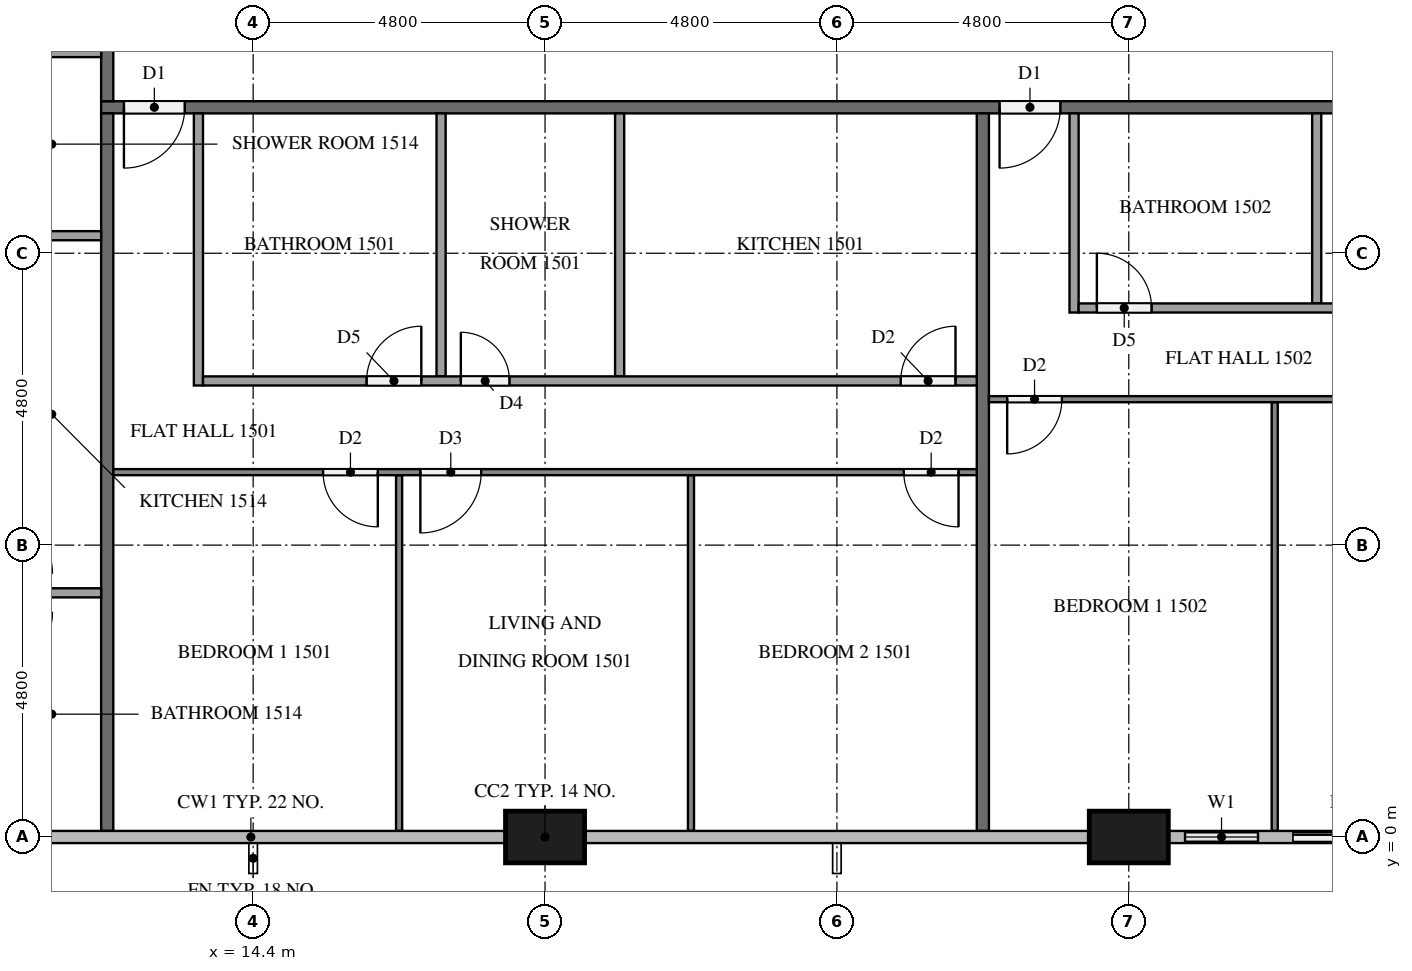
"""IFC4 building model, lengths in metres.
Left out: names, types, materials, properties, quantities, classifications, styles, units other than length and angle.
Written with IfcOpenShell. Run it as: python <this file> out.ifc"""

import sys

from ifc_helpers import new_model, si_unit, direction, frame, frame_2d, origin, origin_2d, place, context, subcontext, project, spatial, rectangle, extrude, element, fill, save


model = new_model("IFC4")
c1 = context("Model", 3, precision=1e-05, world=origin(), true_north=direction((0.0, 1.0)))
c2 = subcontext(c1, "Body", "Model", "MODEL_VIEW")
j1 = project(units=[si_unit("LENGTHUNIT", "METRE"), si_unit("PLANEANGLEUNIT", "RADIAN")], contexts=[c1])
p1 = place(None, origin())
s1 = spatial("IfcSite", under=j1, at=p1, CompositionType="ELEMENT")
p2 = place(p1, origin())
s2 = spatial("IfcBuilding", under=s1, at=p2, CompositionType="ELEMENT")
p3 = place(p2, frame((0.0, 0.0, 62.8)))
s3 = spatial("IfcBuildingStorey", under=s2, at=p3, CompositionType="ELEMENT", Elevation=62.8)
for number, where, z_axis, x_axis in (
    (1, (19.2, 0.0, 0.0), (0.0, 0.0, 1.0), (1.0, 0.0, 0.0)),
    (2, (28.8, 0.0, 0.0), (0.0, 0.0, 1.0), (1.0, 0.0, 0.0)),
):
    element("IfcColumn", number, at=place(p3, frame(where, z_axis=z_axis, x_axis=x_axis)), inside=s3, PredefinedType="COLUMN", context=c2, shape_type="SweptSolid", body=[
        extrude(rectangle(XDim=1.3, YDim=0.85, at=origin_2d()), origin(), (0.0, 0.0, 1.0), 3.2),
    ])
p4 = place(p3, frame((29.45, 0.0, 0.0), z_axis=(0.0, 0.0, 1.0), x_axis=(1.0, 0.0, 0.0)))
e3 = element("IfcWall", 3, at=p4, inside=s3, PredefinedType="SOLIDWALL", context=c2, shape_type="SweptSolid", body=[
    extrude(rectangle(XDim=4.15, YDim=0.15, at=frame_2d((2.075, 0.0))), origin(), (0.0, 0.0, 1.0), 3.2),
])
p5 = place(p4, frame((0.275, 0.0, 0.9)))
e4 = element("IfcOpeningElement", 4, at=p5, cuts=e3, PredefinedType="OPENING", context=c2, shape_type="SweptSolid", body=[
    extrude(rectangle(XDim=1.2, YDim=1.4, at=frame_2d((0.6, 0.7))), frame((0.0, 0.085, 0.0), z_axis=(0.0, -1.0, 0.0), x_axis=(1.0, 0.0, 0.0)), (0.0, 0.0, 1.0), 0.17),
])
p6 = place(p4, frame((2.05, 0.0, 0.0)))
e5 = element("IfcOpeningElement", 5, at=p6, cuts=e3, PredefinedType="OPENING", context=c2, shape_type="SweptSolid", body=[
    extrude(rectangle(XDim=1.8, YDim=2.4, at=frame_2d((0.9, 1.2))), frame((0.0, 0.085, 0.0), z_axis=(0.0, -1.0, 0.0), x_axis=(1.0, 0.0, 0.0)), (0.0, 0.0, 1.0), 0.17),
])
p7 = place(p3, frame((50.5, 12.0, 0.0), z_axis=(0.0, 0.0, 1.0), x_axis=(-1.0, 0.0, 0.0)))
e6 = element("IfcWall", 6, at=p7, inside=s3, PredefinedType="PARTITIONING", context=c2, shape_type="SweptSolid", body=[
    extrude(rectangle(XDim=38.6, YDim=0.2, at=frame_2d((19.3, 0.0))), origin(), (0.0, 0.0, 1.0), 3.2),
])
p8 = place(p7, frame((37.225, 0.0, 0.0)))
e7 = element("IfcOpeningElement", 7, at=p8, cuts=e6, PredefinedType="OPENING", context=c2, shape_type="SweptSolid", body=[
    extrude(rectangle(XDim=1.0, YDim=2.1, at=frame_2d((0.5, 1.05))), frame((0.0, 0.11, 0.0), z_axis=(0.0, -1.0, 0.0), x_axis=(1.0, 0.0, 0.0)), (0.0, 0.0, 1.0), 0.22),
])
p9 = place(p7, frame((22.825, 0.0, 0.0)))
e8 = element("IfcOpeningElement", 8, at=p9, cuts=e6, PredefinedType="OPENING", context=c2, shape_type="SweptSolid", body=[
    extrude(rectangle(XDim=1.0, YDim=2.1, at=frame_2d((0.5, 1.05))), frame((0.0, 0.11, 0.0), z_axis=(0.0, -1.0, 0.0), x_axis=(1.0, 0.0, 0.0)), (0.0, 0.0, 1.0), 0.22),
])
p10 = place(p7, frame((0.375, 0.0, 0.0)))
e9 = element("IfcOpeningElement", 9, at=p10, cuts=e6, PredefinedType="OPENING", context=c2, shape_type="SweptSolid", body=[
    extrude(rectangle(XDim=1.0, YDim=2.1, at=frame_2d((0.5, 1.05))), frame((0.0, 0.11, 0.0), z_axis=(0.0, -1.0, 0.0), x_axis=(1.0, 0.0, 0.0)), (0.0, 0.0, 1.0), 0.22),
])
p11 = place(p3, frame((12.0, 12.1, 0.0), z_axis=(0.0, 0.0, 1.0), x_axis=(0.0, 1.0, 0.0)))
e10 = element("IfcWall", 10, at=p11, inside=s3, PredefinedType="PARTITIONING", context=c2, shape_type="SweptSolid", body=[
    extrude(rectangle(XDim=28.6, YDim=0.2, at=frame_2d((14.3, 0.0))), origin(), (0.0, 0.0, 1.0), 3.2),
])
p12 = place(p11, frame((19.375, 0.0, 0.0)))
e11 = element("IfcOpeningElement", 11, at=p12, cuts=e10, PredefinedType="OPENING", context=c2, shape_type="SweptSolid", body=[
    extrude(rectangle(XDim=1.0, YDim=2.1, at=frame_2d((0.5, 1.05))), frame((0.0, 0.11, 0.0), z_axis=(0.0, -1.0, 0.0), x_axis=(1.0, 0.0, 0.0)), (0.0, 0.0, 1.0), 0.22),
])
p13 = place(p11, frame((12.175, 0.0, 0.0)))
e12 = element("IfcOpeningElement", 12, at=p13, cuts=e10, PredefinedType="OPENING", context=c2, shape_type="SweptSolid", body=[
    extrude(rectangle(XDim=1.0, YDim=2.1, at=frame_2d((0.5, 1.05))), frame((0.0, 0.11, 0.0), z_axis=(0.0, -1.0, 0.0), x_axis=(1.0, 0.0, 0.0)), (0.0, 0.0, 1.0), 0.22),
])
p14 = place(p11, frame((2.575, 0.0, 0.0)))
e13 = element("IfcOpeningElement", 13, at=p14, cuts=e10, PredefinedType="OPENING", context=c2, shape_type="SweptSolid", body=[
    extrude(rectangle(XDim=1.0, YDim=2.1, at=frame_2d((0.5, 1.05))), frame((0.0, 0.11, 0.0), z_axis=(0.0, -1.0, 0.0), x_axis=(1.0, 0.0, 0.0)), (0.0, 0.0, 1.0), 0.22),
])
p15 = place(p11, frame((1.025, 0.0, 0.0)))
e14 = element("IfcOpeningElement", 14, at=p15, cuts=e10, PredefinedType="OPENING", context=c2, shape_type="SweptSolid", body=[
    extrude(rectangle(XDim=1.0, YDim=2.1, at=frame_2d((0.5, 1.05))), frame((0.0, 0.11, 0.0), z_axis=(0.0, -1.0, 0.0), x_axis=(1.0, 0.0, 0.0)), (0.0, 0.0, 1.0), 0.22),
])
for number, where, z_axis, x_axis in (
    (15, (26.4, 11.9, 0.0), (0.0, 0.0, 1.0), (0.0, -1.0, 0.0)),
    (16, (12.0, 0.1, 0.0), (0.0, 0.0, 1.0), (0.0, 1.0, 0.0)),
):
    element("IfcWall", number, at=place(p3, frame(where, z_axis=z_axis, x_axis=x_axis)), inside=s3, PredefinedType="PARTITIONING", context=c2, shape_type="SweptSolid", body=[
        extrude(rectangle(XDim=11.8, YDim=0.2, at=frame_2d((5.9, 0.0))), origin(), (0.0, 0.0, 1.0), 3.2),
    ])
for number, where, z_axis, x_axis in (
    (17, (16.8, 5.95, 0.0), (0.0, 0.0, 1.0), (0.0, -1.0, 0.0)),
    (18, (21.6, 5.95, 0.0), (0.0, 0.0, 1.0), (0.0, -1.0, 0.0)),
):
    element("IfcWall", number, at=place(p3, frame(where, z_axis=z_axis, x_axis=x_axis)), inside=s3, PredefinedType="PARTITIONING", context=c2, shape_type="SweptSolid", body=[
        extrude(rectangle(XDim=5.85, YDim=0.1, at=frame_2d((2.925, 0.0))), origin(), (0.0, 0.0, 1.0), 3.2),
    ])
p16 = place(p3, frame((26.3, 6.0, 0.0), z_axis=(0.0, 0.0, 1.0), x_axis=(-1.0, 0.0, 0.0)))
e19 = element("IfcWall", 19, at=p16, inside=s3, PredefinedType="PARTITIONING", context=c2, shape_type="SweptSolid", body=[
    extrude(rectangle(XDim=14.2, YDim=0.1, at=frame_2d((7.1, 0.0))), origin(), (0.0, 0.0, 1.0), 3.2),
])
p17 = place(p16, frame((9.85, 0.0, 0.0)))
e20 = element("IfcOpeningElement", 20, at=p17, cuts=e19, PredefinedType="OPENING", context=c2, shape_type="SweptSolid", body=[
    extrude(rectangle(XDim=0.9, YDim=2.1, at=frame_2d((0.45, 1.05))), frame((0.0, 0.06, 0.0), z_axis=(0.0, -1.0, 0.0), x_axis=(1.0, 0.0, 0.0)), (0.0, 0.0, 1.0), 0.12),
])
p18 = place(p16, frame((8.15, 0.0, 0.0)))
e21 = element("IfcOpeningElement", 21, at=p18, cuts=e19, PredefinedType="OPENING", context=c2, shape_type="SweptSolid", body=[
    extrude(rectangle(XDim=1.0, YDim=2.1, at=frame_2d((0.5, 1.05))), frame((0.0, 0.06, 0.0), z_axis=(0.0, -1.0, 0.0), x_axis=(1.0, 0.0, 0.0)), (0.0, 0.0, 1.0), 0.12),
])
p19 = place(p16, frame((0.3, 0.0, 0.0)))
e22 = element("IfcOpeningElement", 22, at=p19, cuts=e19, PredefinedType="OPENING", context=c2, shape_type="SweptSolid", body=[
    extrude(rectangle(XDim=0.9, YDim=2.1, at=frame_2d((0.45, 1.05))), frame((0.0, 0.06, 0.0), z_axis=(0.0, -1.0, 0.0), x_axis=(1.0, 0.0, 0.0)), (0.0, 0.0, 1.0), 0.12),
])
for number, where, z_axis, x_axis in (
    (23, (17.49, 11.9, 0.0), (0.0, 0.0, 1.0), (0.0, -1.0, 0.0)),
    (24, (20.427, 11.9, 0.0), (0.0, 0.0, 1.0), (0.0, -1.0, 0.0)),
):
    element("IfcWall", number, at=place(p3, frame(where, z_axis=z_axis, x_axis=x_axis)), inside=s3, PredefinedType="PARTITIONING", context=c2, shape_type="SweptSolid", body=[
        extrude(rectangle(XDim=4.325, YDim=0.15, at=frame_2d((2.163, 0.0))), origin(), (0.0, 0.0, 1.0), 3.2),
    ])
p20 = place(p3, frame((13.5, 11.9, 0.0), z_axis=(0.0, 0.0, 1.0), x_axis=(0.0, -1.0, 0.0)))
e25 = element("IfcWall", 25, at=p20, inside=s3, PredefinedType="PARTITIONING", context=c2, shape_type="SweptSolid", body=[
    extrude(rectangle(XDim=4.475, YDim=0.15, at=frame_2d((2.237, 0.0))), origin(), (0.0, 0.0, 1.0), 3.2),
])
p21 = place(p3, frame((13.575, 7.5, 0.0), z_axis=(0.0, 0.0, 1.0), x_axis=(1.0, 0.0, 0.0)))
e26 = element("IfcWall", 26, at=p21, inside=s3, PredefinedType="PARTITIONING", context=c2, shape_type="SweptSolid", body=[
    extrude(rectangle(XDim=12.725, YDim=0.15, at=frame_2d((6.363, 0.0))), origin(), (0.0, 0.0, 1.0), 3.2),
])
p22 = place(p21, frame((2.69, 0.0, 0.0)))
e27 = element("IfcOpeningElement", 27, at=p22, cuts=e26, PredefinedType="OPENING", context=c2, shape_type="SweptSolid", body=[
    extrude(rectangle(XDim=0.9, YDim=2.1, at=frame_2d((0.45, 1.05))), frame((0.0, 0.085, 0.0), z_axis=(0.0, -1.0, 0.0), x_axis=(1.0, 0.0, 0.0)), (0.0, 0.0, 1.0), 0.17),
])
p23 = place(p21, frame((4.24, 0.0, 0.0)))
e28 = element("IfcOpeningElement", 28, at=p23, cuts=e26, PredefinedType="OPENING", context=c2, shape_type="SweptSolid", body=[
    extrude(rectangle(XDim=0.8, YDim=2.1, at=frame_2d((0.4, 1.05))), frame((0.0, 0.085, 0.0), z_axis=(0.0, -1.0, 0.0), x_axis=(1.0, 0.0, 0.0)), (0.0, 0.0, 1.0), 0.17),
])
p24 = place(p21, frame((11.475, 0.0, 0.0)))
e29 = element("IfcOpeningElement", 29, at=p24, cuts=e26, PredefinedType="OPENING", context=c2, shape_type="SweptSolid", body=[
    extrude(rectangle(XDim=0.9, YDim=2.1, at=frame_2d((0.45, 1.05))), frame((0.0, 0.085, 0.0), z_axis=(0.0, -1.0, 0.0), x_axis=(1.0, 0.0, 0.0)), (0.0, 0.0, 1.0), 0.17),
])
p25 = place(p3, frame((31.2, 7.15, 0.0), z_axis=(0.0, 0.0, 1.0), x_axis=(0.0, -1.0, 0.0)))
e30 = element("IfcWall", 30, at=p25, inside=s3, PredefinedType="PARTITIONING", context=c2, shape_type="SweptSolid", body=[
    extrude(rectangle(XDim=7.05, YDim=0.1, at=frame_2d((3.525, 0.0))), origin(), (0.0, 0.0, 1.0), 3.2),
])
p26 = place(p3, frame((40.7, 7.2, 0.0), z_axis=(0.0, 0.0, 1.0), x_axis=(-1.0, 0.0, 0.0)))
e31 = element("IfcWall", 31, at=p26, inside=s3, PredefinedType="PARTITIONING", context=c2, shape_type="SweptSolid", body=[
    extrude(rectangle(XDim=14.2, YDim=0.1, at=frame_2d((7.1, 0.0))), origin(), (0.0, 0.0, 1.0), 3.2),
])
p27 = place(p26, frame((13.0, 0.0, 0.0)))
e32 = element("IfcOpeningElement", 32, at=p27, cuts=e31, PredefinedType="OPENING", context=c2, shape_type="SweptSolid", body=[
    extrude(rectangle(XDim=0.9, YDim=2.1, at=frame_2d((0.45, 1.05))), frame((0.0, 0.06, 0.0), z_axis=(0.0, -1.0, 0.0), x_axis=(1.0, 0.0, 0.0)), (0.0, 0.0, 1.0), 0.12),
])
p28 = place(p26, frame((5.05, 0.0, 0.0)))
e33 = element("IfcOpeningElement", 33, at=p28, cuts=e31, PredefinedType="OPENING", context=c2, shape_type="SweptSolid", body=[
    extrude(rectangle(XDim=1.0, YDim=2.1, at=frame_2d((0.5, 1.05))), frame((0.0, 0.06, 0.0), z_axis=(0.0, -1.0, 0.0), x_axis=(1.0, 0.0, 0.0)), (0.0, 0.0, 1.0), 0.12),
])
p29 = place(p26, frame((3.45, 0.0, 0.0)))
e34 = element("IfcOpeningElement", 34, at=p29, cuts=e31, PredefinedType="OPENING", context=c2, shape_type="SweptSolid", body=[
    extrude(rectangle(XDim=0.9, YDim=2.1, at=frame_2d((0.45, 1.05))), frame((0.0, 0.06, 0.0), z_axis=(0.0, -1.0, 0.0), x_axis=(1.0, 0.0, 0.0)), (0.0, 0.0, 1.0), 0.12),
])
p30 = place(p3, frame((31.89, 11.9, 0.0), z_axis=(0.0, 0.0, 1.0), x_axis=(0.0, -1.0, 0.0)))
e35 = element("IfcWall", 35, at=p30, inside=s3, PredefinedType="PARTITIONING", context=c2, shape_type="SweptSolid", body=[
    extrude(rectangle(XDim=3.125, YDim=0.15, at=frame_2d((1.562, 0.0))), origin(), (0.0, 0.0, 1.0), 3.2),
])
p31 = place(p3, frame((27.9, 11.9, 0.0), z_axis=(0.0, 0.0, 1.0), x_axis=(0.0, -1.0, 0.0)))
e36 = element("IfcWall", 36, at=p31, inside=s3, PredefinedType="PARTITIONING", context=c2, shape_type="SweptSolid", body=[
    extrude(rectangle(XDim=3.275, YDim=0.15, at=frame_2d((1.637, 0.0))), origin(), (0.0, 0.0, 1.0), 3.2),
])
p32 = place(p3, frame((27.975, 8.7, 0.0), z_axis=(0.0, 0.0, 1.0), x_axis=(1.0, 0.0, 0.0)))
e37 = element("IfcWall", 37, at=p32, inside=s3, PredefinedType="PARTITIONING", context=c2, shape_type="SweptSolid", body=[
    extrude(rectangle(XDim=12.725, YDim=0.15, at=frame_2d((6.362, 0.0))), origin(), (0.0, 0.0, 1.0), 3.2),
])
p33 = place(p32, frame((0.3, 0.0, 0.0)))
e38 = element("IfcOpeningElement", 38, at=p33, cuts=e37, PredefinedType="OPENING", context=c2, shape_type="SweptSolid", body=[
    extrude(rectangle(XDim=0.9, YDim=2.1, at=frame_2d((0.45, 1.05))), frame((0.0, 0.085, 0.0), z_axis=(0.0, -1.0, 0.0), x_axis=(1.0, 0.0, 0.0)), (0.0, 0.0, 1.0), 0.17),
])
p34 = place(p32, frame((5.727, 0.0, 0.0)))
e39 = element("IfcOpeningElement", 39, at=p34, cuts=e37, PredefinedType="OPENING", context=c2, shape_type="SweptSolid", body=[
    extrude(rectangle(XDim=0.8, YDim=2.1, at=frame_2d((0.4, 1.05))), frame((0.0, 0.085, 0.0), z_axis=(0.0, -1.0, 0.0), x_axis=(1.0, 0.0, 0.0)), (0.0, 0.0, 1.0), 0.17),
])
p35 = place(p32, frame((7.177, 0.0, 0.0)))
e40 = element("IfcOpeningElement", 40, at=p35, cuts=e37, PredefinedType="OPENING", context=c2, shape_type="SweptSolid", body=[
    extrude(rectangle(XDim=0.9, YDim=2.1, at=frame_2d((0.45, 1.05))), frame((0.0, 0.085, 0.0), z_axis=(0.0, -1.0, 0.0), x_axis=(1.0, 0.0, 0.0)), (0.0, 0.0, 1.0), 0.17),
])
for number, where, z_axis, x_axis in (
    (41, (11.9, 9.888, 0.0), (0.0, 0.0, 1.0), (-1.0, 0.0, 0.0)),
    (42, (11.9, 4.015, 0.0), (0.0, 0.0, 1.0), (-1.0, 0.0, 0.0)),
):
    element("IfcWall", number, at=place(p3, frame(where, z_axis=z_axis, x_axis=x_axis)), inside=s3, PredefinedType="PARTITIONING", context=c2, shape_type="SweptSolid", body=[
        extrude(rectangle(XDim=1.625, YDim=0.15, at=frame_2d((0.812, 0.0))), origin(), (0.0, 0.0, 1.0), 3.2),
    ])
p36 = place(p3, frame((11.9, 12.9, 0.0), z_axis=(0.0, 0.0, 1.0), x_axis=(-1.0, 0.0, 0.0)))
e43 = element("IfcWall", 43, at=p36, inside=s3, PredefinedType="PARTITIONING", context=c2, shape_type="SweptSolid", body=[
    extrude(rectangle(XDim=1.775, YDim=0.15, at=frame_2d((0.887, 0.0))), origin(), (0.0, 0.0, 1.0), 3.2),
])
p37 = place(p5, origin())
e44 = element("IfcWindow", 44, at=p37, inside=s3, PartitioningType="SINGLE_PANEL", PredefinedType="WINDOW", context=c2, shape_type="SweptSolid", body=[
    extrude(rectangle(XDim=1.2, YDim=1.4, at=frame_2d((0.6, 0.7))), frame((0.0, 0.03, 0.0), z_axis=(0.0, -1.0, 0.0), x_axis=(1.0, 0.0, 0.0)), (0.0, 0.0, 1.0), 0.06),
])
fill(e4, e44)
p38 = place(p6, origin())
e45 = element("IfcDoor", 45, at=p38, inside=s3, OperationType="SLIDING_TO_LEFT", PredefinedType="DOOR", context=c2, shape_type="SweptSolid", body=[
    extrude(rectangle(XDim=1.8, YDim=2.4, at=frame_2d((0.9, 1.2))), frame((0.0, 0.025, 0.0), z_axis=(0.0, -1.0, 0.0), x_axis=(1.0, 0.0, 0.0)), (0.0, 0.0, 1.0), 0.05),
])
fill(e5, e45)
p39 = place(p8, origin())
e46 = element("IfcDoor", 46, at=p39, inside=s3, OperationType="SINGLE_SWING_RIGHT", PredefinedType="DOOR", context=c2, shape_type="SweptSolid", body=[
    extrude(rectangle(XDim=1.0, YDim=2.1, at=frame_2d((0.5, 1.05))), frame((0.0, 0.025, 0.0), z_axis=(0.0, -1.0, 0.0), x_axis=(1.0, 0.0, 0.0)), (0.0, 0.0, 1.0), 0.05),
])
fill(e7, e46)
p40 = place(p9, origin())
e47 = element("IfcDoor", 47, at=p40, inside=s3, OperationType="SINGLE_SWING_RIGHT", PredefinedType="DOOR", context=c2, shape_type="SweptSolid", body=[
    extrude(rectangle(XDim=1.0, YDim=2.1, at=frame_2d((0.5, 1.05))), frame((0.0, 0.025, 0.0), z_axis=(0.0, -1.0, 0.0), x_axis=(1.0, 0.0, 0.0)), (0.0, 0.0, 1.0), 0.05),
])
fill(e8, e47)
p41 = place(p17, origin())
e48 = element("IfcDoor", 48, at=p41, inside=s3, OperationType="SINGLE_SWING_LEFT", PredefinedType="DOOR", context=c2, shape_type="SweptSolid", body=[
    extrude(rectangle(XDim=0.9, YDim=2.1, at=frame_2d((0.45, 1.05))), frame((0.0, 0.025, 0.0), z_axis=(0.0, -1.0, 0.0), x_axis=(1.0, 0.0, 0.0)), (0.0, 0.0, 1.0), 0.05),
])
fill(e20, e48)
p42 = place(p18, origin())
e49 = element("IfcDoor", 49, at=p42, inside=s3, OperationType="SINGLE_SWING_RIGHT", PredefinedType="DOOR", context=c2, shape_type="SweptSolid", body=[
    extrude(rectangle(XDim=1.0, YDim=2.1, at=frame_2d((0.5, 1.05))), frame((0.0, 0.025, 0.0), z_axis=(0.0, -1.0, 0.0), x_axis=(1.0, 0.0, 0.0)), (0.0, 0.0, 1.0), 0.05),
])
fill(e21, e49)
p43 = place(p19, origin())
e50 = element("IfcDoor", 50, at=p43, inside=s3, OperationType="SINGLE_SWING_LEFT", PredefinedType="DOOR", context=c2, shape_type="SweptSolid", body=[
    extrude(rectangle(XDim=0.9, YDim=2.1, at=frame_2d((0.45, 1.05))), frame((0.0, 0.025, 0.0), z_axis=(0.0, -1.0, 0.0), x_axis=(1.0, 0.0, 0.0)), (0.0, 0.0, 1.0), 0.05),
])
fill(e22, e50)
p44 = place(p22, origin())
e51 = element("IfcDoor", 51, at=p44, inside=s3, OperationType="SINGLE_SWING_RIGHT", PredefinedType="DOOR", context=c2, shape_type="SweptSolid", body=[
    extrude(rectangle(XDim=0.9, YDim=2.1, at=frame_2d((0.45, 1.05))), frame((0.0, 0.025, 0.0), z_axis=(0.0, -1.0, 0.0), x_axis=(1.0, 0.0, 0.0)), (0.0, 0.0, 1.0), 0.05),
])
fill(e27, e51)
p45 = place(p23, origin())
e52 = element("IfcDoor", 52, at=p45, inside=s3, OperationType="SINGLE_SWING_LEFT", PredefinedType="DOOR", context=c2, shape_type="SweptSolid", body=[
    extrude(rectangle(XDim=0.8, YDim=2.1, at=frame_2d((0.4, 1.05))), frame((0.0, 0.025, 0.0), z_axis=(0.0, -1.0, 0.0), x_axis=(1.0, 0.0, 0.0)), (0.0, 0.0, 1.0), 0.05),
])
fill(e28, e52)
p46 = place(p24, origin())
e53 = element("IfcDoor", 53, at=p46, inside=s3, OperationType="SINGLE_SWING_RIGHT", PredefinedType="DOOR", context=c2, shape_type="SweptSolid", body=[
    extrude(rectangle(XDim=0.9, YDim=2.1, at=frame_2d((0.45, 1.05))), frame((0.0, 0.025, 0.0), z_axis=(0.0, -1.0, 0.0), x_axis=(1.0, 0.0, 0.0)), (0.0, 0.0, 1.0), 0.05),
])
fill(e29, e53)
p47 = place(p27, origin())
e54 = element("IfcDoor", 54, at=p47, inside=s3, OperationType="SINGLE_SWING_RIGHT", PredefinedType="DOOR", context=c2, shape_type="SweptSolid", body=[
    extrude(rectangle(XDim=0.9, YDim=2.1, at=frame_2d((0.45, 1.05))), frame((0.0, 0.025, 0.0), z_axis=(0.0, -1.0, 0.0), x_axis=(1.0, 0.0, 0.0)), (0.0, 0.0, 1.0), 0.05),
])
fill(e32, e54)
p48 = place(p33, origin())
e55 = element("IfcDoor", 55, at=p48, inside=s3, OperationType="SINGLE_SWING_LEFT", PredefinedType="DOOR", context=c2, shape_type="SweptSolid", body=[
    extrude(rectangle(XDim=0.9, YDim=2.1, at=frame_2d((0.45, 1.05))), frame((0.0, 0.025, 0.0), z_axis=(0.0, -1.0, 0.0), x_axis=(1.0, 0.0, 0.0)), (0.0, 0.0, 1.0), 0.05),
])
fill(e38, e55)
save(model, sys.argv[1])
